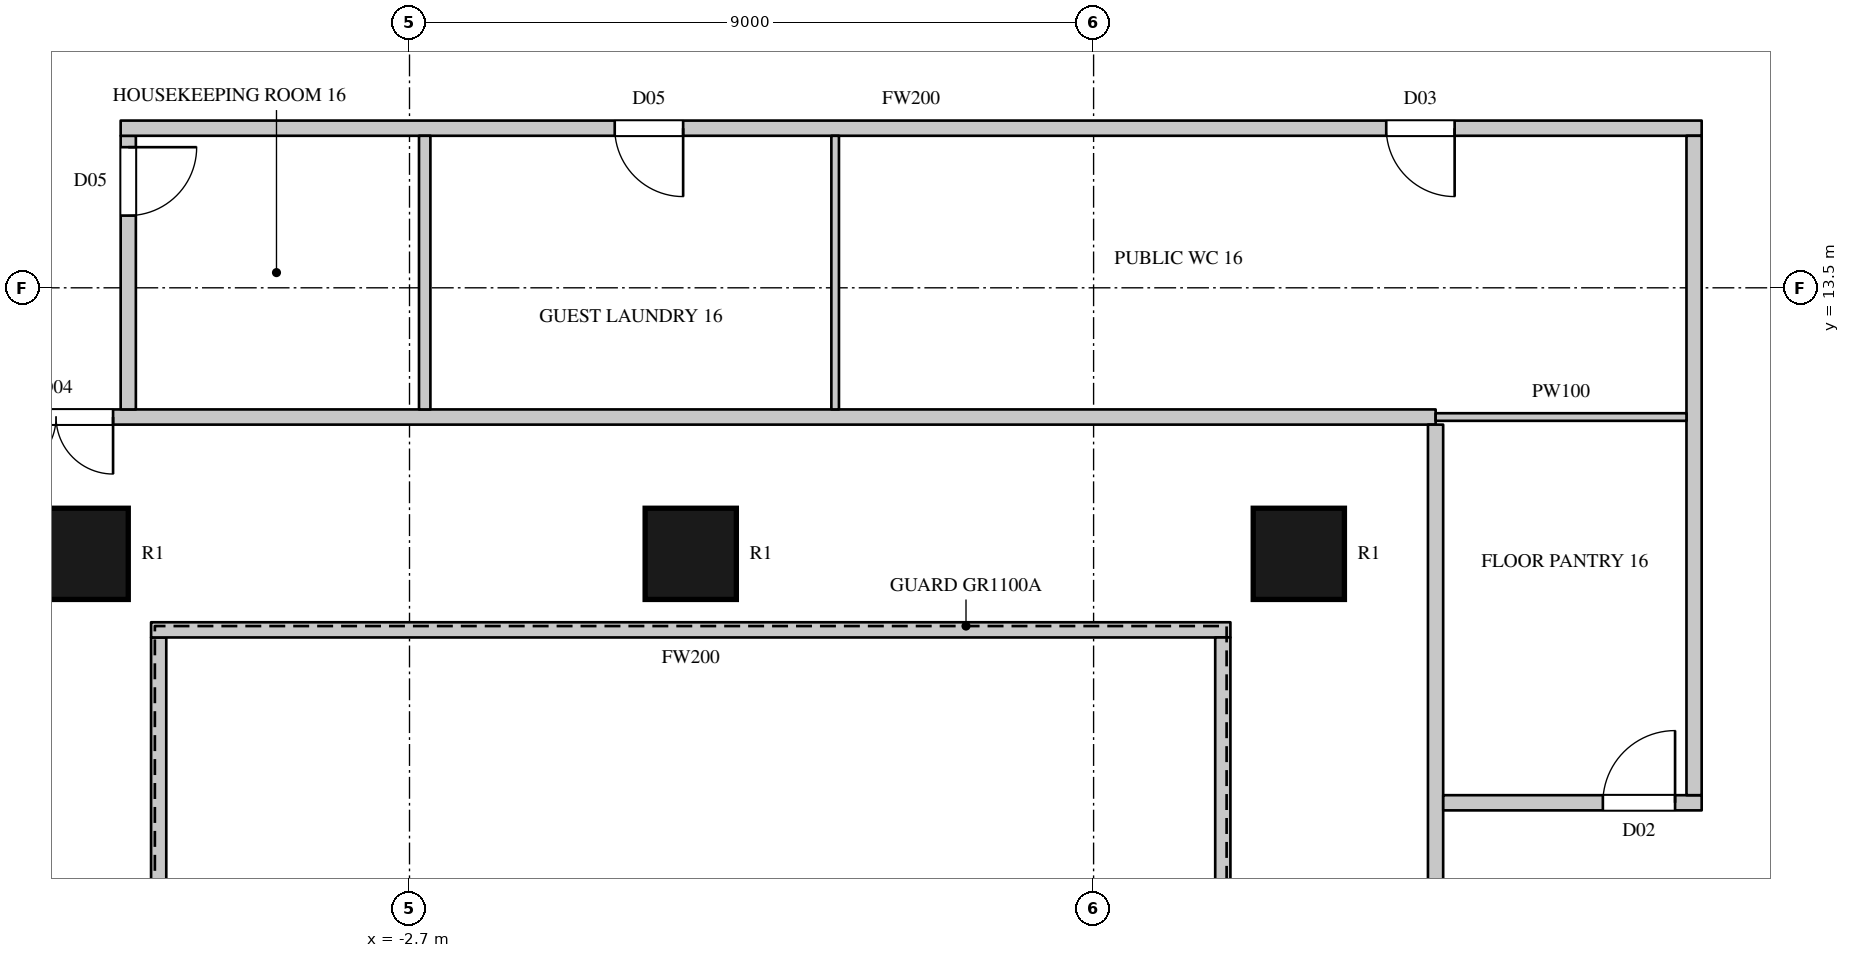
"""IFC4 building model, lengths in metres.
Left out: names, types, materials, properties, quantities, classifications, styles, units other than length and angle.
Written with IfcOpenShell. Run it as: python <this file> out.ifc"""

import sys

from ifc_helpers import new_model, si_unit, direction, frame, frame_2d, origin, origin_2d, place, context, subcontext, project, spatial, rectangle, circle, extrude, element, fill, save


model = new_model("IFC4")
c1 = context("Model", 3, precision=1e-05, world=origin(), true_north=direction((0.0, 1.0)))
c2 = subcontext(c1, "Body", "Model", "MODEL_VIEW")
j1 = project(units=[si_unit("LENGTHUNIT", "METRE"), si_unit("PLANEANGLEUNIT", "RADIAN")], contexts=[c1])
p1 = place(None, origin())
s1 = spatial("IfcSite", under=j1, at=p1, CompositionType="ELEMENT")
p2 = place(p1, origin())
s2 = spatial("IfcBuilding", under=s1, at=p2, CompositionType="ELEMENT")
p3 = place(p2, frame((0.0, 0.0, 87.9)))
s3 = spatial("IfcBuildingStorey", under=s2, at=p3, CompositionType="ELEMENT", Elevation=87.9)
for number, where, z_axis, x_axis in (
    (1, (-7.0, 10.0, 0.0), (0.0, 0.0, 1.0), (1.0, 0.0, 0.0)),
    (2, (1.0, 10.0, 0.0), (0.0, 0.0, 1.0), (1.0, 0.0, 0.0)),
    (3, (9.0, 10.0, 0.0), (0.0, 0.0, 1.0), (1.0, 0.0, 0.0)),
):
    element("IfcColumn", number, at=place(p3, frame(where, z_axis=z_axis, x_axis=x_axis)), inside=s3, PredefinedType="COLUMN", context=c2, shape_type="SweptSolid", body=[
        extrude(circle(Radius=0.6, at=origin_2d()), origin(), (0.0, 0.0, 1.0), 3.6),
    ])
p4 = place(p3, frame((-8.9, 11.8, 0.0), z_axis=(0.0, 0.0, 1.0), x_axis=(1.0, 0.0, 0.0)))
e4 = element("IfcWall", 4, at=p4, inside=s3, PredefinedType="PARTITIONING", context=c2, shape_type="SweptSolid", body=[
    extrude(rectangle(XDim=19.7, YDim=0.2, at=frame_2d((9.85, 0.0))), origin(), (0.0, 0.0, 1.0), 3.3),
])
p5 = place(p4, frame((0.8, 0.0, 0.0)))
e5 = element("IfcOpeningElement", 5, at=p5, cuts=e4, PredefinedType="OPENING", context=c2, shape_type="SweptSolid", body=[
    extrude(rectangle(XDim=1.5, YDim=2.2, at=frame_2d((0.75, 1.1))), frame((0.0, 0.11, 0.0), z_axis=(0.0, -1.0, 0.0), x_axis=(1.0, 0.0, 0.0)), (0.0, 0.0, 1.0), 0.22),
])
p6 = place(p3, frame((-6.4, 11.9, 0.0), z_axis=(0.0, 0.0, 1.0), x_axis=(0.0, 1.0, 0.0)))
e6 = element("IfcWall", 6, at=p6, inside=s3, PredefinedType="PARTITIONING", context=c2, shape_type="SweptSolid", body=[
    extrude(rectangle(XDim=3.6, YDim=0.2, at=frame_2d((1.8, 0.0))), origin(), (0.0, 0.0, 1.0), 3.3),
])
p7 = place(p6, frame((2.55, 0.0, 0.0)))
e7 = element("IfcOpeningElement", 7, at=p7, cuts=e6, PredefinedType="OPENING", context=c2, shape_type="SweptSolid", body=[
    extrude(rectangle(XDim=0.9, YDim=2.2, at=frame_2d((0.45, 1.1))), frame((0.0, 0.11, 0.0), z_axis=(0.0, -1.0, 0.0), x_axis=(1.0, 0.0, 0.0)), (0.0, 0.0, 1.0), 0.22),
])
p8 = place(p3, frame((-6.5, 15.6, 0.0), z_axis=(0.0, 0.0, 1.0), x_axis=(1.0, 0.0, 0.0)))
e8 = element("IfcWall", 8, at=p8, inside=s3, PredefinedType="PARTITIONING", context=c2, shape_type="SweptSolid", body=[
    extrude(rectangle(XDim=20.8, YDim=0.2, at=frame_2d((10.4, 0.0))), origin(), (0.0, 0.0, 1.0), 3.3),
])
p9 = place(p8, frame((6.5, 0.0, 0.0)))
e9 = element("IfcOpeningElement", 9, at=p9, cuts=e8, PredefinedType="OPENING", context=c2, shape_type="SweptSolid", body=[
    extrude(rectangle(XDim=0.9, YDim=2.2, at=frame_2d((0.45, 1.1))), frame((0.0, 0.11, 0.0), z_axis=(0.0, -1.0, 0.0), x_axis=(1.0, 0.0, 0.0)), (0.0, 0.0, 1.0), 0.22),
])
p10 = place(p8, frame((16.65, 0.0, 0.0)))
e10 = element("IfcOpeningElement", 10, at=p10, cuts=e8, PredefinedType="OPENING", context=c2, shape_type="SweptSolid", body=[
    extrude(rectangle(XDim=0.9, YDim=2.2, at=frame_2d((0.45, 1.1))), frame((0.0, 0.11, 0.0), z_axis=(0.0, -1.0, 0.0), x_axis=(1.0, 0.0, 0.0)), (0.0, 0.0, 1.0), 0.22),
])
p11 = place(p3, frame((-6.0, -8.9, 0.0), z_axis=(0.0, 0.0, 1.0), x_axis=(0.0, 1.0, 0.0)))
e11 = element("IfcWall", 11, at=p11, inside=s3, PredefinedType="PARTITIONING", context=c2, shape_type="SweptSolid", body=[
    extrude(rectangle(XDim=17.8, YDim=0.2, at=frame_2d((8.9, 0.0))), origin(), (0.0, 0.0, 1.0), 3.3),
])
p12 = place(p3, frame((-6.1, 9.0, 0.0), z_axis=(0.0, 0.0, 1.0), x_axis=(1.0, 0.0, 0.0)))
e12 = element("IfcWall", 12, at=p12, inside=s3, PredefinedType="PARTITIONING", context=c2, shape_type="SweptSolid", body=[
    extrude(rectangle(XDim=14.2, YDim=0.2, at=frame_2d((7.1, 0.0))), origin(), (0.0, 0.0, 1.0), 3.3),
])
p13 = place(p3, frame((8.0, -8.9, 0.0), z_axis=(0.0, 0.0, 1.0), x_axis=(0.0, 1.0, 0.0)))
e13 = element("IfcWall", 13, at=p13, inside=s3, PredefinedType="PARTITIONING", context=c2, shape_type="SweptSolid", body=[
    extrude(rectangle(XDim=17.8, YDim=0.2, at=frame_2d((8.9, 0.0))), origin(), (0.0, 0.0, 1.0), 3.3),
])
p14 = place(p3, frame((10.799, -12.5, 0.0), z_axis=(0.0, 0.0, 1.0), x_axis=(0.0, 1.0, 0.0)))
e14 = element("IfcWall", 14, at=p14, inside=s3, PredefinedType="PARTITIONING", context=c2, shape_type="SweptSolid", body=[
    extrude(rectangle(XDim=24.2, YDim=0.2, at=frame_2d((12.1, 0.0))), origin(), (0.0, 0.0, 1.0), 3.3),
])
p15 = place(p14, frame((13.15, 0.0, 0.0)))
e15 = element("IfcOpeningElement", 15, at=p15, cuts=e14, PredefinedType="OPENING", context=c2, shape_type="SweptSolid", body=[
    extrude(rectangle(XDim=1.5, YDim=2.2, at=frame_2d((0.75, 1.1))), frame((0.0, 0.11, 0.0), z_axis=(0.0, -1.0, 0.0), x_axis=(1.0, 0.0, 0.0)), (0.0, 0.0, 1.0), 0.22),
])
p16 = place(p3, frame((10.9, 6.725, 0.0), z_axis=(0.0, 0.0, 1.0), x_axis=(1.0, 0.0, 0.0)))
e16 = element("IfcWall", 16, at=p16, inside=s3, PredefinedType="PARTITIONING", context=c2, shape_type="SweptSolid", body=[
    extrude(rectangle(XDim=3.4, YDim=0.2, at=frame_2d((1.7, 0.0))), origin(), (0.0, 0.0, 1.0), 3.3),
])
p17 = place(p16, frame((2.1, 0.0, 0.0)))
e17 = element("IfcOpeningElement", 17, at=p17, cuts=e16, PredefinedType="OPENING", context=c2, shape_type="SweptSolid", body=[
    extrude(rectangle(XDim=0.95, YDim=2.2, at=frame_2d((0.475, 1.1))), frame((0.0, 0.11, 0.0), z_axis=(0.0, -1.0, 0.0), x_axis=(1.0, 0.0, 0.0)), (0.0, 0.0, 1.0), 0.22),
])
p18 = place(p3, frame((14.2, 6.825, 0.0), z_axis=(0.0, 0.0, 1.0), x_axis=(0.0, 1.0, 0.0)))
e18 = element("IfcWall", 18, at=p18, inside=s3, PredefinedType="PARTITIONING", context=c2, shape_type="SweptSolid", body=[
    extrude(rectangle(XDim=8.675, YDim=0.2, at=frame_2d((4.337, 0.0))), origin(), (0.0, 0.0, 1.0), 3.3),
])
p19 = place(p3, frame((-2.5, 11.9, 0.0), z_axis=(0.0, 0.0, 1.0), x_axis=(0.0, 1.0, 0.0)))
e19 = element("IfcWall", 19, at=p19, inside=s3, PredefinedType="PARTITIONING", context=c2, shape_type="SweptSolid", body=[
    extrude(rectangle(XDim=3.6, YDim=0.15, at=frame_2d((1.8, 0.0))), origin(), (0.0, 0.0, 1.0), 2.75),
])
p20 = place(p3, frame((2.9, 11.9, 0.0), z_axis=(0.0, 0.0, 1.0), x_axis=(0.0, 1.0, 0.0)))
e20 = element("IfcWall", 20, at=p20, inside=s3, PredefinedType="PARTITIONING", context=c2, shape_type="SweptSolid", body=[
    extrude(rectangle(XDim=3.6, YDim=0.1, at=frame_2d((1.8, 0.0))), origin(), (0.0, 0.0, 1.0), 3.3),
])
p21 = place(p3, frame((10.8, 11.8, 0.0), z_axis=(0.0, 0.0, 1.0), x_axis=(1.0, 0.0, 0.0)))
e21 = element("IfcWall", 21, at=p21, inside=s3, PredefinedType="PARTITIONING", context=c2, shape_type="SweptSolid", body=[
    extrude(rectangle(XDim=3.3, YDim=0.1, at=frame_2d((1.65, 0.0))), origin(), (0.0, 0.0, 1.0), 3.3),
])
p22 = place(p5, origin())
e22 = element("IfcDoor", 22, at=p22, inside=s3, OperationType="DOUBLE_DOOR_SINGLE_SWING", PredefinedType="DOOR", context=c2, shape_type="SweptSolid", body=[
    extrude(rectangle(XDim=1.5, YDim=2.2, at=frame_2d((0.75, 1.1))), frame((0.0, 0.025, 0.0), z_axis=(0.0, -1.0, 0.0), x_axis=(1.0, 0.0, 0.0)), (0.0, 0.0, 1.0), 0.05),
])
fill(e5, e22)
p23 = place(p7, origin())
e23 = element("IfcDoor", 23, at=p23, inside=s3, OperationType="SINGLE_SWING_LEFT", PredefinedType="DOOR", context=c2, shape_type="SweptSolid", body=[
    extrude(rectangle(XDim=0.9, YDim=2.2, at=frame_2d((0.45, 1.1))), frame((0.0, 0.025, 0.0), z_axis=(0.0, -1.0, 0.0), x_axis=(1.0, 0.0, 0.0)), (0.0, 0.0, 1.0), 0.05),
])
fill(e7, e23)
p24 = place(p9, origin())
e24 = element("IfcDoor", 24, at=p24, inside=s3, OperationType="SINGLE_SWING_LEFT", PredefinedType="DOOR", context=c2, shape_type="SweptSolid", body=[
    extrude(rectangle(XDim=0.9, YDim=2.2, at=frame_2d((0.45, 1.1))), frame((0.0, 0.025, 0.0), z_axis=(0.0, -1.0, 0.0), x_axis=(1.0, 0.0, 0.0)), (0.0, 0.0, 1.0), 0.05),
])
fill(e9, e24)
p25 = place(p10, origin())
e25 = element("IfcDoor", 25, at=p25, inside=s3, OperationType="SINGLE_SWING_LEFT", PredefinedType="DOOR", context=c2, shape_type="SweptSolid", body=[
    extrude(rectangle(XDim=0.9, YDim=2.2, at=frame_2d((0.45, 1.1))), frame((0.0, 0.025, 0.0), z_axis=(0.0, -1.0, 0.0), x_axis=(1.0, 0.0, 0.0)), (0.0, 0.0, 1.0), 0.05),
])
fill(e10, e25)
p26 = place(p17, origin())
e26 = element("IfcDoor", 26, at=p26, inside=s3, OperationType="SINGLE_SWING_RIGHT", PredefinedType="DOOR", context=c2, shape_type="SweptSolid", body=[
    extrude(rectangle(XDim=0.95, YDim=2.2, at=frame_2d((0.475, 1.1))), frame((0.0, 0.025, 0.0), z_axis=(0.0, -1.0, 0.0), x_axis=(1.0, 0.0, 0.0)), (0.0, 0.0, 1.0), 0.05),
])
fill(e17, e26)
save(model, sys.argv[1])
